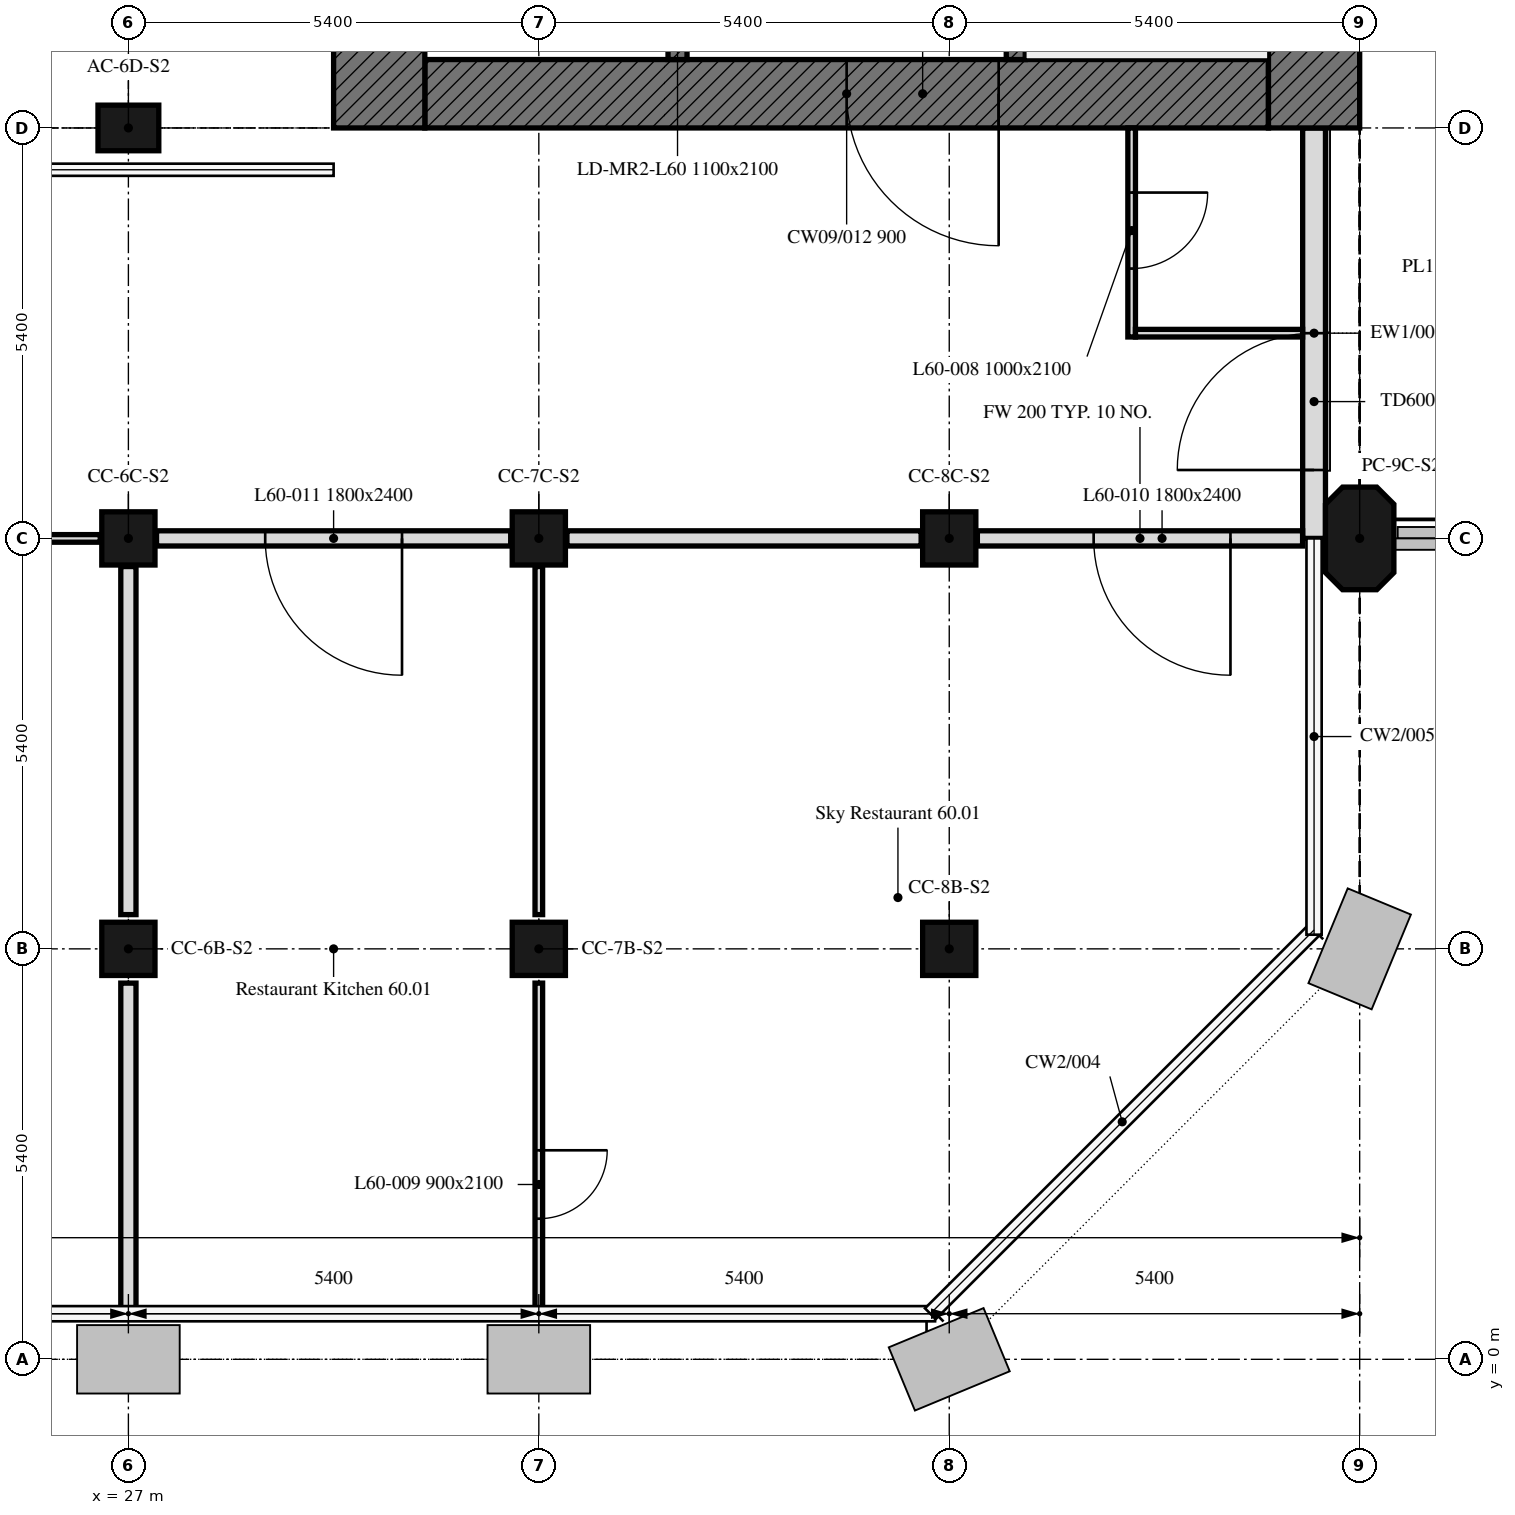
"""IFC4 building model, lengths in metres.
Left out: names, types, materials, properties, quantities, classifications, styles, units other than length and angle.
Written with IfcOpenShell. Run it as: python <this file> out.ifc"""

import sys

from ifc_helpers import new_model, si_unit, direction, frame, frame_2d, origin, origin_2d, place, context, subcontext, project, spatial, polyline, rectangle, outline, extrude, element, fill, save


model = new_model("IFC4")
c1 = context("Model", 3, precision=1e-05, world=origin(), true_north=direction((0.0, 1.0)))
c2 = subcontext(c1, "Body", "Model", "MODEL_VIEW")
j1 = project(units=[si_unit("LENGTHUNIT", "METRE"), si_unit("PLANEANGLEUNIT", "RADIAN")], contexts=[c1])
p1 = place(None, origin())
s1 = spatial("IfcSite", under=j1, at=p1, CompositionType="ELEMENT")
p2 = place(p1, origin())
s2 = spatial("IfcBuilding", under=s1, at=p2, CompositionType="ELEMENT")
p3 = place(p2, frame((0.0, 0.0, 243.1)))
s3 = spatial("IfcBuildingStorey", under=s2, at=p3, CompositionType="ELEMENT", Elevation=243.1)
for number, where, z_axis, x_axis in (
    (1, (27.0, 5.4, 0.0), (0.0, 0.0, 1.0), (1.0, 0.0, 0.0)),
    (2, (32.4, 5.4, 0.0), (0.0, 0.0, 1.0), (1.0, 0.0, 0.0)),
    (3, (37.8, 5.4, 0.0), (0.0, 0.0, 1.0), (1.0, 0.0, 0.0)),
    (4, (27.0, 10.8, 0.0), (0.0, 0.0, 1.0), (1.0, 0.0, 0.0)),
    (5, (32.4, 10.8, 0.0), (0.0, 0.0, 1.0), (1.0, 0.0, 0.0)),
    (6, (37.8, 10.8, 0.0), (0.0, 0.0, 1.0), (1.0, 0.0, 0.0)),
):
    element("IfcColumn", number, at=place(p3, frame(where, z_axis=z_axis, x_axis=x_axis)), inside=s3, PredefinedType="COLUMN", context=c2, shape_type="SweptSolid", body=[
        extrude(rectangle(XDim=0.7, YDim=0.7, at=origin_2d()), origin(), (0.0, 0.0, 1.0), 7.5),
    ])
p4 = place(p3, frame((43.2, 10.8, 0.0), z_axis=(0.0, 0.0, 1.0), x_axis=(0.0, 1.0, 0.0)))
e7 = element("IfcColumn", 7, at=p4, inside=s3, PredefinedType="COLUMN", context=c2, shape_type="SweptSolid", body=[
    extrude(outline(polyline([(-0.45, -0.45), (0.45, -0.45), (0.675, -0.225), (0.675, 0.225), (0.45, 0.45), (-0.45, 0.45), (-0.675, 0.225), (-0.675, -0.225), (-0.45, -0.45)])), origin(), (0.0, 0.0, 1.0), 7.5),
])
p5 = place(p3, frame((27.0, 16.2, 0.0), z_axis=(0.0, 0.0, 1.0), x_axis=(1.0, 0.0, 0.0)))
e8 = element("IfcColumn", 8, at=p5, inside=s3, PredefinedType="COLUMN", context=c2, shape_type="SweptSolid", body=[
    extrude(rectangle(XDim=0.8, YDim=0.6, at=origin_2d()), origin(), (0.0, 0.0, 1.0), 7.5),
])
p6 = place(p3, frame((42.6, 10.8, 0.0), z_axis=(0.0, 0.0, 1.0), x_axis=(0.0, 1.0, 0.0)))
e9 = element("IfcWall", 9, at=p6, inside=s3, PredefinedType="SOLIDWALL", context=c2, shape_type="SweptSolid", body=[
    extrude(rectangle(XDim=5.4, YDim=0.3, at=frame_2d((2.7, 0.0))), origin(), (0.0, 0.0, 1.0), 7.5),
])
p7 = place(p6, frame((0.9, 0.0, 0.0)))
e10 = element("IfcOpeningElement", 10, at=p7, cuts=e9, PredefinedType="OPENING", context=c2, shape_type="SweptSolid", body=[
    extrude(rectangle(XDim=1.8, YDim=2.4, at=frame_2d((0.9, 1.2))), frame((0.0, 0.16, 0.0), z_axis=(0.0, -1.0, 0.0), x_axis=(1.0, 0.0, 0.0)), (0.0, 0.0, 1.0), 0.32),
])
p8 = place(p3, frame((42.0, 16.65, 0.0), z_axis=(0.0, 0.0, 1.0), x_axis=(-1.0, 0.0, 0.0)))
e11 = element("IfcWall", 11, at=p8, inside=s3, PredefinedType="SOLIDWALL", context=c2, shape_type="SweptSolid", body=[
    extrude(rectangle(XDim=11.1, YDim=0.9, at=frame_2d((5.55, 0.0))), origin(), (0.0, 0.0, 1.0), 7.5),
])
p9 = place(p8, frame((3.55, 0.0, 0.0)))
e12 = element("IfcOpeningElement", 12, at=p9, cuts=e11, PredefinedType="OPENING", context=c2, shape_type="SweptSolid", body=[
    extrude(rectangle(XDim=2.0, YDim=2.4, at=frame_2d((1.0, 1.2))), frame((0.0, 0.45, 0.0), z_axis=(0.0, -1.0, 0.0), x_axis=(1.0, 0.0, 0.0)), (0.0, 0.0, 1.0), 0.9),
])
for number, where, z_axis, x_axis in (
    (13, (42.6, 32.4, 0.0), (0.0, 0.0, 1.0), (0.0, -1.0, 0.0)),
    (14, (30.3, 16.2, 0.0), (0.0, 0.0, 1.0), (0.0, 1.0, 0.0)),
):
    element("IfcWall", number, at=place(p3, frame(where, z_axis=z_axis, x_axis=x_axis)), inside=s3, PredefinedType="SOLIDWALL", context=c2, shape_type="SweptSolid", body=[
        extrude(rectangle(XDim=16.2, YDim=1.2, at=frame_2d((8.1, 0.0))), origin(), (0.0, 0.0, 1.0), 7.5),
    ])
p10 = place(p3, frame((38.675, 17.1, 0.0), z_axis=(0.0, 0.0, 1.0), x_axis=(0.0, 1.0, 0.0)))
e15 = element("IfcWall", 15, at=p10, inside=s3, PredefinedType="SOLIDWALL", context=c2, shape_type="SweptSolid", body=[
    extrude(rectangle(XDim=14.4, YDim=0.25, at=frame_2d((7.2, 0.0))), origin(), (0.0, 0.0, 1.0), 7.5),
])
p11 = place(p10, frame((4.6, 0.0, 0.0)))
e16 = element("IfcOpeningElement", 16, at=p11, cuts=e15, PredefinedType="OPENING", context=c2, shape_type="SweptSolid", body=[
    extrude(rectangle(XDim=1.0, YDim=2.1, at=frame_2d((0.5, 1.05))), frame((0.0, 0.125, 0.0), z_axis=(0.0, -1.0, 0.0), x_axis=(1.0, 0.0, 0.0)), (0.0, 0.0, 1.0), 0.25),
])
p12 = place(p10, frame((7.062, 0.0, 0.0)))
e17 = element("IfcOpeningElement", 17, at=p12, cuts=e15, PredefinedType="OPENING", context=c2, shape_type="SweptSolid", body=[
    extrude(rectangle(XDim=1.2, YDim=2.1, at=frame_2d((0.6, 1.05))), frame((0.0, 0.125, 0.0), z_axis=(0.0, -1.0, 0.0), x_axis=(1.0, 0.0, 0.0)), (0.0, 0.0, 1.0), 0.25),
])
p13 = place(p10, frame((9.979, 0.0, 0.0)))
e18 = element("IfcOpeningElement", 18, at=p13, cuts=e15, PredefinedType="OPENING", context=c2, shape_type="SweptSolid", body=[
    extrude(rectangle(XDim=0.9, YDim=2.1, at=frame_2d((0.45, 1.05))), frame((0.0, 0.125, 0.0), z_axis=(0.0, -1.0, 0.0), x_axis=(1.0, 0.0, 0.0)), (0.0, 0.0, 1.0), 0.25),
])
p14 = place(p10, frame((11.92, 0.0, 0.0)))
e19 = element("IfcOpeningElement", 19, at=p14, cuts=e15, PredefinedType="OPENING", context=c2, shape_type="SweptSolid", body=[
    extrude(rectangle(XDim=0.9, YDim=2.1, at=frame_2d((0.45, 1.05))), frame((0.0, 0.125, 0.0), z_axis=(0.0, -1.0, 0.0), x_axis=(1.0, 0.0, 0.0)), (0.0, 0.0, 1.0), 0.25),
])
p15 = place(p10, frame((13.354, 0.0, 0.0)))
e20 = element("IfcOpeningElement", 20, at=p15, cuts=e15, PredefinedType="OPENING", context=c2, shape_type="SweptSolid", body=[
    extrude(rectangle(XDim=0.9, YDim=2.1, at=frame_2d((0.45, 1.05))), frame((0.0, 0.125, 0.0), z_axis=(0.0, -1.0, 0.0), x_axis=(1.0, 0.0, 0.0)), (0.0, 0.0, 1.0), 0.25),
])
p16 = place(p3, frame((34.225, 17.1, 0.0), z_axis=(0.0, 0.0, 1.0), x_axis=(0.0, 1.0, 0.0)))
e21 = element("IfcWall", 21, at=p16, inside=s3, PredefinedType="SOLIDWALL", context=c2, shape_type="SweptSolid", body=[
    extrude(rectangle(XDim=14.4, YDim=0.25, at=frame_2d((7.2, 0.0))), origin(), (0.0, 0.0, 1.0), 7.5),
])
p17 = place(p16, frame((13.15, 0.0, 0.0)))
e22 = element("IfcOpeningElement", 22, at=p17, cuts=e21, PredefinedType="OPENING", context=c2, shape_type="SweptSolid", body=[
    extrude(rectangle(XDim=1.0, YDim=2.1, at=frame_2d((0.5, 1.05))), frame((0.0, 0.125, 0.0), z_axis=(0.0, -1.0, 0.0), x_axis=(1.0, 0.0, 0.0)), (0.0, 0.0, 1.0), 0.25),
])
p18 = place(p16, frame((0.6, 0.0, 0.0)))
e23 = element("IfcOpeningElement", 23, at=p18, cuts=e21, PredefinedType="OPENING", context=c2, shape_type="SweptSolid", body=[
    extrude(rectangle(XDim=1.1, YDim=2.1, at=frame_2d((0.55, 1.05))), frame((0.0, 0.125, 0.0), z_axis=(0.0, -1.0, 0.0), x_axis=(1.0, 0.0, 0.0)), (0.0, 0.0, 1.0), 0.25),
])
p19 = place(p16, frame((3.15, 0.0, 0.0)))
e24 = element("IfcOpeningElement", 24, at=p19, cuts=e21, PredefinedType="OPENING", context=c2, shape_type="SweptSolid", body=[
    extrude(rectangle(XDim=1.1, YDim=2.1, at=frame_2d((0.55, 1.05))), frame((0.0, 0.125, 0.0), z_axis=(0.0, -1.0, 0.0), x_axis=(1.0, 0.0, 0.0)), (0.0, 0.0, 1.0), 0.25),
])
p20 = place(p16, frame((6.025, 0.0, 0.0)))
e25 = element("IfcOpeningElement", 25, at=p20, cuts=e21, PredefinedType="OPENING", context=c2, shape_type="SweptSolid", body=[
    extrude(rectangle(XDim=1.2, YDim=2.1, at=frame_2d((0.6, 1.05))), frame((0.0, 0.125, 0.0), z_axis=(0.0, -1.0, 0.0), x_axis=(1.0, 0.0, 0.0)), (0.0, 0.0, 1.0), 0.25),
])
p21 = place(p3, frame((42.449, 10.8, 0.0), z_axis=(0.0, 0.0, 1.0), x_axis=(-1.0, 0.0, 0.0)))
e26 = element("IfcWall", 26, at=p21, inside=s3, PredefinedType="PARTITIONING", context=c2, shape_type="SweptSolid", body=[
    extrude(rectangle(XDim=4.279, YDim=0.2, at=frame_2d((2.14, 0.0))), origin(), (0.0, 0.0, 1.0), 7.5),
])
p22 = place(p21, frame((0.949, 0.0, 0.0)))
e27 = element("IfcOpeningElement", 27, at=p22, cuts=e26, PredefinedType="OPENING", context=c2, shape_type="SweptSolid", body=[
    extrude(rectangle(XDim=1.8, YDim=2.4, at=frame_2d((0.9, 1.2))), frame((0.0, 0.1, 0.0), z_axis=(0.0, -1.0, 0.0), x_axis=(1.0, 0.0, 0.0)), (0.0, 0.0, 1.0), 0.2),
])
p23 = place(p3, frame((37.43, 10.8, 0.0), z_axis=(0.0, 0.0, 1.0), x_axis=(-1.0, 0.0, 0.0)))
e28 = element("IfcWall", 28, at=p23, inside=s3, PredefinedType="PARTITIONING", context=c2, shape_type="SweptSolid", body=[
    extrude(rectangle(XDim=4.66, YDim=0.2, at=frame_2d((2.33, 0.0))), origin(), (0.0, 0.0, 1.0), 7.5),
])
p24 = place(p3, frame((32.4, 10.43, 0.0), z_axis=(0.0, 0.0, 1.0), x_axis=(0.0, -1.0, 0.0)))
e29 = element("IfcWall", 29, at=p24, inside=s3, PredefinedType="PARTITIONING", context=c2, shape_type="SweptSolid", body=[
    extrude(rectangle(XDim=4.579, YDim=0.1, at=frame_2d((2.29, 0.0))), origin(), (0.0, 0.0, 1.0), 6.75),
])
p25 = place(p3, frame((32.4, 4.949, 0.0), z_axis=(0.0, 0.0, 1.0), x_axis=(0.0, -1.0, 0.0)))
e30 = element("IfcWall", 30, at=p25, inside=s3, PredefinedType="PARTITIONING", context=c2, shape_type="SweptSolid", body=[
    extrude(rectangle(XDim=4.349, YDim=0.1, at=frame_2d((2.175, 0.0))), origin(), (0.0, 0.0, 1.0), 6.75),
])
p26 = place(p25, frame((2.199, 0.0, 0.0)))
e31 = element("IfcOpeningElement", 31, at=p26, cuts=e30, PredefinedType="OPENING", context=c2, shape_type="SweptSolid", body=[
    extrude(rectangle(XDim=0.9, YDim=2.1, at=frame_2d((0.45, 1.05))), frame((0.0, 0.05, 0.0), z_axis=(0.0, -1.0, 0.0), x_axis=(1.0, 0.0, 0.0)), (0.0, 0.0, 1.0), 0.1),
])
p27 = place(p3, frame((32.03, 10.8, 0.0), z_axis=(0.0, 0.0, 1.0), x_axis=(-1.0, 0.0, 0.0)))
e32 = element("IfcWall", 32, at=p27, inside=s3, PredefinedType="PARTITIONING", context=c2, shape_type="SweptSolid", body=[
    extrude(rectangle(XDim=4.66, YDim=0.2, at=frame_2d((2.33, 0.0))), origin(), (0.0, 0.0, 1.0), 7.5),
])
p28 = place(p27, frame((1.43, 0.0, 0.0)))
e33 = element("IfcOpeningElement", 33, at=p28, cuts=e32, PredefinedType="OPENING", context=c2, shape_type="SweptSolid", body=[
    extrude(rectangle(XDim=1.8, YDim=2.4, at=frame_2d((0.9, 1.2))), frame((0.0, 0.1, 0.0), z_axis=(0.0, -1.0, 0.0), x_axis=(1.0, 0.0, 0.0)), (0.0, 0.0, 1.0), 0.2),
])
p29 = place(p3, frame((27.0, 10.43, 0.0), z_axis=(0.0, 0.0, 1.0), x_axis=(0.0, -1.0, 0.0)))
e34 = element("IfcWall", 34, at=p29, inside=s3, PredefinedType="PARTITIONING", context=c2, shape_type="SweptSolid", body=[
    extrude(rectangle(XDim=4.579, YDim=0.2, at=frame_2d((2.29, 0.0))), origin(), (0.0, 0.0, 1.0), 6.75),
])
p30 = place(p3, frame((27.0, 4.949, 0.0), z_axis=(0.0, 0.0, 1.0), x_axis=(0.0, -1.0, 0.0)))
e35 = element("IfcWall", 35, at=p30, inside=s3, PredefinedType="PARTITIONING", context=c2, shape_type="SweptSolid", body=[
    extrude(rectangle(XDim=4.349, YDim=0.2, at=frame_2d((2.175, 0.0))), origin(), (0.0, 0.0, 1.0), 6.75),
])
p31 = place(p3, frame((26.63, 10.8, 0.0), z_axis=(0.0, 0.0, 1.0), x_axis=(-1.0, 0.0, 0.0)))
e36 = element("IfcWall", 36, at=p31, inside=s3, PredefinedType="PARTITIONING", context=c2, shape_type="SweptSolid", body=[
    extrude(rectangle(XDim=4.66, YDim=0.1, at=frame_2d((2.33, 0.0))), origin(), (0.0, 0.0, 1.0), 7.5),
])
p32 = place(p31, frame((1.33, 0.0, 0.0)))
e37 = element("IfcOpeningElement", 37, at=p32, cuts=e36, PredefinedType="OPENING", context=c2, shape_type="SweptSolid", body=[
    extrude(rectangle(XDim=1.8, YDim=2.4, at=frame_2d((0.9, 1.2))), frame((0.0, 0.05, 0.0), z_axis=(0.0, -1.0, 0.0), x_axis=(1.0, 0.0, 0.0)), (0.0, 0.0, 1.0), 0.1),
])
p33 = place(p3, frame((40.2, 16.2, 0.0), z_axis=(0.0, 0.0, 1.0), x_axis=(0.0, -1.0, 0.0)))
e38 = element("IfcWall", 38, at=p33, inside=s3, PredefinedType="PARTITIONING", context=c2, shape_type="SweptSolid", body=[
    extrude(rectangle(XDim=2.75, YDim=0.1, at=frame_2d((1.375, 0.0))), origin(), (0.0, 0.0, 1.0), 7.5),
])
p34 = place(p33, frame((0.85, 0.0, 0.0)))
e39 = element("IfcOpeningElement", 39, at=p34, cuts=e38, PredefinedType="OPENING", context=c2, shape_type="SweptSolid", body=[
    extrude(rectangle(XDim=1.0, YDim=2.1, at=frame_2d((0.5, 1.05))), frame((0.0, 0.05, 0.0), z_axis=(0.0, -1.0, 0.0), x_axis=(1.0, 0.0, 0.0)), (0.0, 0.0, 1.0), 0.1),
])
p35 = place(p3, frame((40.25, 13.5, 0.0), z_axis=(0.0, 0.0, 1.0), x_axis=(1.0, 0.0, 0.0)))
e40 = element("IfcWall", 40, at=p35, inside=s3, PredefinedType="PARTITIONING", context=c2, shape_type="SweptSolid", body=[
    extrude(rectangle(XDim=2.199, YDim=0.1, at=frame_2d((1.1, 0.0))), origin(), (0.0, 0.0, 1.0), 7.5),
])
p36 = place(p7, origin())
e41 = element("IfcDoor", 41, at=p36, inside=s3, OperationType="DOUBLE_DOOR_DOUBLE_SWING", PredefinedType="DOOR", context=c2, shape_type="SweptSolid", body=[
    extrude(rectangle(XDim=1.8, YDim=2.4, at=frame_2d((0.9, 1.2))), frame((0.0, 0.025, 0.0), z_axis=(0.0, -1.0, 0.0), x_axis=(1.0, 0.0, 0.0)), (0.0, 0.0, 1.0), 0.05),
])
fill(e10, e41)
p37 = place(p9, origin())
e42 = element("IfcDoor", 42, at=p37, inside=s3, OperationType="DOUBLE_DOOR_SINGLE_SWING", PredefinedType="DOOR", context=c2, shape_type="SweptSolid", body=[
    extrude(rectangle(XDim=2.0, YDim=2.4, at=frame_2d((1.0, 1.2))), frame((0.0, 0.025, 0.0), z_axis=(0.0, -1.0, 0.0), x_axis=(1.0, 0.0, 0.0)), (0.0, 0.0, 1.0), 0.05),
])
fill(e12, e42)
p38 = place(p34, origin())
e43 = element("IfcDoor", 43, at=p38, inside=s3, OperationType="SINGLE_SWING_RIGHT", PredefinedType="DOOR", context=c2, shape_type="SweptSolid", body=[
    extrude(rectangle(XDim=1.0, YDim=2.1, at=frame_2d((0.5, 1.05))), frame((0.0, 0.025, 0.0), z_axis=(0.0, -1.0, 0.0), x_axis=(1.0, 0.0, 0.0)), (0.0, 0.0, 1.0), 0.05),
])
fill(e39, e43)
p39 = place(p26, origin())
e44 = element("IfcDoor", 44, at=p39, inside=s3, OperationType="SINGLE_SWING_RIGHT", PredefinedType="DOOR", context=c2, shape_type="SweptSolid", body=[
    extrude(rectangle(XDim=0.9, YDim=2.1, at=frame_2d((0.45, 1.05))), frame((0.0, 0.025, 0.0), z_axis=(0.0, -1.0, 0.0), x_axis=(1.0, 0.0, 0.0)), (0.0, 0.0, 1.0), 0.05),
])
fill(e31, e44)
p40 = place(p22, origin())
e45 = element("IfcDoor", 45, at=p40, inside=s3, OperationType="DOUBLE_DOOR_SINGLE_SWING", PredefinedType="DOOR", context=c2, shape_type="SweptSolid", body=[
    extrude(rectangle(XDim=1.8, YDim=2.4, at=frame_2d((0.9, 1.2))), frame((0.0, 0.025, 0.0), z_axis=(0.0, -1.0, 0.0), x_axis=(1.0, 0.0, 0.0)), (0.0, 0.0, 1.0), 0.05),
])
fill(e27, e45)
p41 = place(p28, origin())
e46 = element("IfcDoor", 46, at=p41, inside=s3, OperationType="DOUBLE_DOOR_SINGLE_SWING", PredefinedType="DOOR", context=c2, shape_type="SweptSolid", body=[
    extrude(rectangle(XDim=1.8, YDim=2.4, at=frame_2d((0.9, 1.2))), frame((0.0, 0.025, 0.0), z_axis=(0.0, -1.0, 0.0), x_axis=(1.0, 0.0, 0.0)), (0.0, 0.0, 1.0), 0.05),
])
fill(e33, e46)
save(model, sys.argv[1])
